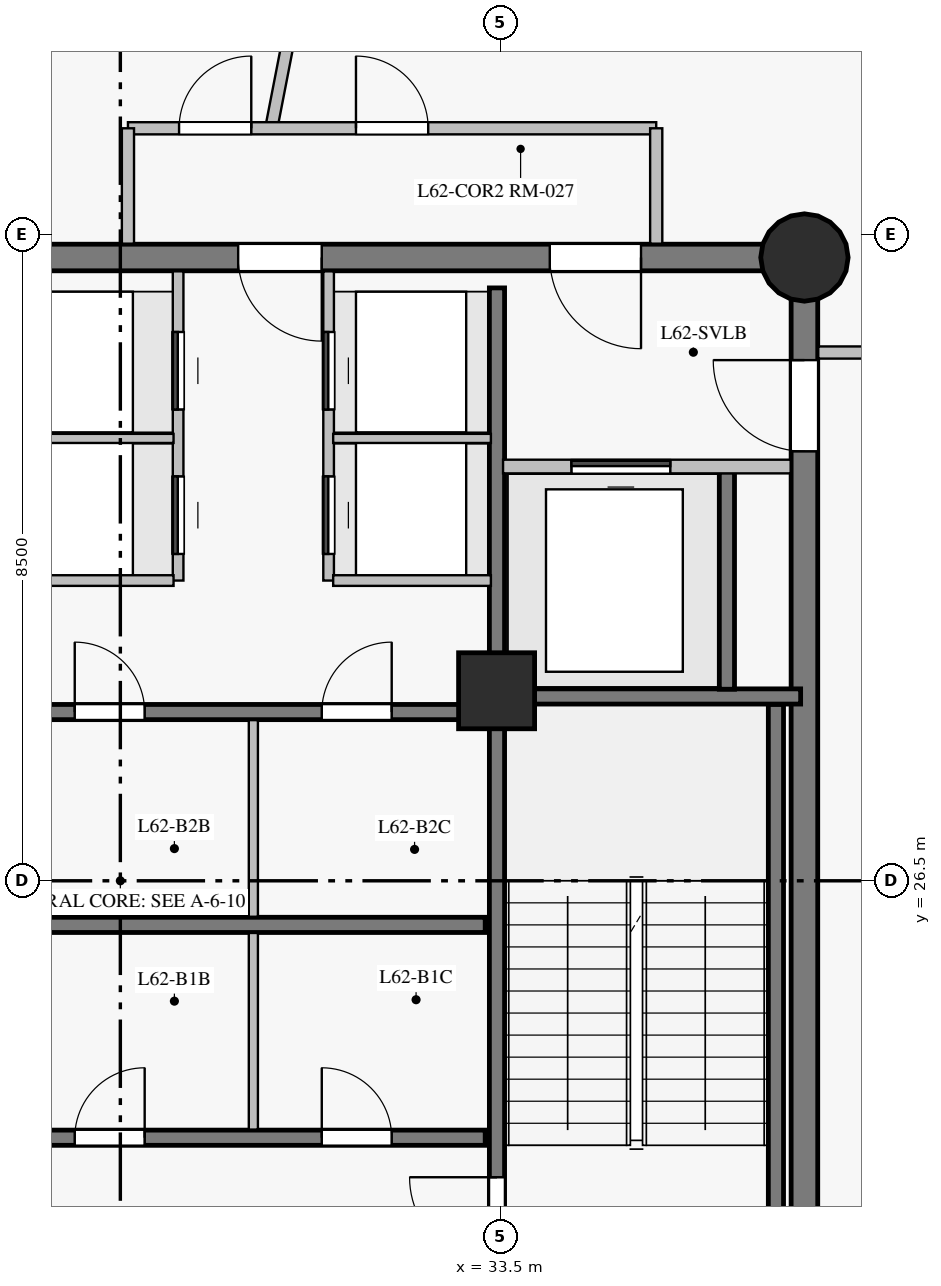
"""IFC4 building model, lengths in metres.
Left out: names, types, materials, properties, quantities, classifications, styles, units other than length and angle.
Written with IfcOpenShell. Run it as: python <this file> out.ifc"""

import sys

from ifc_helpers import new_model, si_unit, direction, frame, frame_2d, origin, origin_with_axes, origin_2d, place, context, subcontext, project, spatial, rectangle, circle, extrude, source, transform, mapped, element, fill, save


model = new_model("IFC4")
c1 = context("Model", 3, precision=1e-05, world=origin(), true_north=direction((0.0, 1.0)))
c2 = subcontext(c1, "Body", "Model", "MODEL_VIEW")
j1 = project(units=[si_unit("LENGTHUNIT", "METRE"), si_unit("PLANEANGLEUNIT", "RADIAN")], contexts=[c1])
p1 = place(None, origin())
s1 = spatial("IfcSite", under=j1, at=p1, CompositionType="ELEMENT")
p2 = place(p1, origin())
s2 = spatial("IfcBuilding", under=s1, at=p2, CompositionType="ELEMENT")
p3 = place(p2, frame((0.0, 0.0, 212.9)))
s3 = spatial("IfcBuildingStorey", under=s2, at=p3, CompositionType="ELEMENT", Elevation=212.9)
p4 = place(p3, frame((37.5, 18.3, 0.0), z_axis=(0.0, 0.0, 1.0), x_axis=(0.0, 1.0, 0.0)))
e1 = element("IfcWall", 1, at=p4, inside=s3, PredefinedType="SHEAR", context=c2, shape_type="SweptSolid", body=[
    extrude(rectangle(XDim=16.4, YDim=0.35, at=frame_2d((8.2, 0.0))), origin(), (0.0, 0.0, 1.0), 3.8),
])
p5 = place(p4, frame((13.85, 0.0, 0.0)))
e2 = element("IfcOpeningElement", 2, at=p5, cuts=e1, PredefinedType="OPENING", context=c2, shape_type="SweptSolid", body=[
    extrude(rectangle(XDim=1.2, YDim=2.15, at=frame_2d((0.6, 1.075))), frame((0.0, 0.185, 0.0), z_axis=(0.0, -1.0, 0.0), x_axis=(1.0, 0.0, 0.0)), (0.0, 0.0, 1.0), 0.37),
])
p6 = place(p3, frame((37.5, 34.7, 0.0), z_axis=(0.0, 0.0, 1.0), x_axis=(-1.0, 0.0, 0.0)))
e3 = element("IfcWall", 3, at=p6, inside=s3, PredefinedType="SHEAR", context=c2, shape_type="SweptSolid", body=[
    extrude(rectangle(XDim=10.95, YDim=0.35, at=frame_2d((5.475, 0.0))), origin(), (0.0, 0.0, 1.0), 3.8),
])
p7 = place(p6, frame((2.15, 0.0, 0.0)))
e4 = element("IfcOpeningElement", 4, at=p7, cuts=e3, PredefinedType="OPENING", context=c2, shape_type="SweptSolid", body=[
    extrude(rectangle(XDim=1.2, YDim=2.15, at=frame_2d((0.6, 1.075))), frame((0.0, 0.185, 0.0), z_axis=(0.0, -1.0, 0.0), x_axis=(1.0, 0.0, 0.0)), (0.0, 0.0, 1.0), 0.37),
])
p8 = place(p6, frame((6.35, 0.0, 0.0)))
e5 = element("IfcOpeningElement", 5, at=p8, cuts=e3, PredefinedType="OPENING", context=c2, shape_type="SweptSolid", body=[
    extrude(rectangle(XDim=1.1, YDim=2.15, at=frame_2d((0.55, 1.075))), frame((0.0, 0.185, 0.0), z_axis=(0.0, -1.0, 0.0), x_axis=(1.0, 0.0, 0.0)), (0.0, 0.0, 1.0), 0.37),
])
m1 = source(origin_with_axes(), c2, "Body", "SweptSolid", [
    extrude(circle(Radius=0.575, at=origin_2d()), origin(), (0.0, 0.0, 1.0), 4.0),
])
p9 = place(p3, frame((37.5, 34.7, 0.0), z_axis=(0.0, 0.0, 1.0), x_axis=(1.0, 0.0, 0.0)))
e6 = element("IfcColumn", 6, at=p9, inside=s3, PredefinedType="COLUMN", context=c2, shape_type="MappedRepresentation", body=[
    mapped(m1, transform((0.0, 0.0, 0.0), scale=1.0)),
])
m2 = source(origin_with_axes(), c2, "Body", "SweptSolid", [
    extrude(rectangle(XDim=1.0, YDim=1.0, at=origin_2d()), origin(), (0.0, 0.0, 1.0), 4.0),
])
p10 = place(p3, frame((33.45, 29.0, 0.0), z_axis=(0.0, 0.0, 1.0), x_axis=(1.0, 0.0, 0.0)))
e7 = element("IfcColumn", 7, at=p10, inside=s3, PredefinedType="COLUMN", context=c2, shape_type="MappedRepresentation", body=[
    mapped(m2, transform((0.0, 0.0, 0.0), scale=1.0)),
])
p11 = place(p3, frame((33.455, 18.7, 0.0), z_axis=(0.0, 0.0, 1.0), x_axis=(0.0, 1.0, 0.0)))
e8 = element("IfcWall", 8, at=p11, inside=s3, PredefinedType="SHEAR", context=c2, shape_type="SweptSolid", body=[
    extrude(rectangle(XDim=15.6, YDim=0.2, at=frame_2d((7.8, 0.0))), origin(), (0.0, 0.0, 1.0), 3.8),
])
p12 = place(p11, frame((2.75, 0.0, 0.0)))
e9 = element("IfcOpeningElement", 9, at=p12, cuts=e8, PredefinedType="OPENING", context=c2, shape_type="SweptSolid", body=[
    extrude(rectangle(XDim=1.15, YDim=2.15, at=frame_2d((0.575, 1.075))), frame((0.0, 0.11, 0.0), z_axis=(0.0, -1.0, 0.0), x_axis=(1.0, 0.0, 0.0)), (0.0, 0.0, 1.0), 0.22),
])
p13 = place(p11, frame((0.55, 0.0, 0.0)))
e10 = element("IfcOpeningElement", 10, at=p13, cuts=e8, PredefinedType="OPENING", context=c2, shape_type="SweptSolid", body=[
    extrude(rectangle(XDim=0.94, YDim=2.1, at=frame_2d((0.47, 1.05))), frame((0.0, 0.11, 0.0), z_axis=(0.0, -1.0, 0.0), x_axis=(1.0, 0.0, 0.0)), (0.0, 0.0, 1.0), 0.22),
])
p14 = place(p3, frame((23.7, 23.12, 0.0), z_axis=(0.0, 0.0, 1.0), x_axis=(1.0, 0.0, 0.0)))
e11 = element("IfcWall", 11, at=p14, inside=s3, PredefinedType="SHEAR", context=c2, shape_type="SweptSolid", body=[
    extrude(rectangle(XDim=9.6, YDim=0.2, at=frame_2d((4.8, 0.0))), origin(), (0.0, 0.0, 1.0), 3.8),
])
p15 = place(p14, frame((0.7, 0.0, 0.0)))
e12 = element("IfcOpeningElement", 12, at=p15, cuts=e11, PredefinedType="OPENING", context=c2, shape_type="SweptSolid", body=[
    extrude(rectangle(XDim=0.92, YDim=2.1, at=frame_2d((0.46, 1.05))), frame((0.0, 0.11, 0.0), z_axis=(0.0, -1.0, 0.0), x_axis=(1.0, 0.0, 0.0)), (0.0, 0.0, 1.0), 0.22),
])
p16 = place(p14, frame((4.2, 0.0, 0.0)))
e13 = element("IfcOpeningElement", 13, at=p16, cuts=e11, PredefinedType="OPENING", context=c2, shape_type="SweptSolid", body=[
    extrude(rectangle(XDim=0.92, YDim=2.1, at=frame_2d((0.46, 1.05))), frame((0.0, 0.11, 0.0), z_axis=(0.0, -1.0, 0.0), x_axis=(1.0, 0.0, 0.0)), (0.0, 0.0, 1.0), 0.22),
])
p17 = place(p14, frame((7.45, 0.0, 0.0)))
e14 = element("IfcOpeningElement", 14, at=p17, cuts=e11, PredefinedType="OPENING", context=c2, shape_type="SweptSolid", body=[
    extrude(rectangle(XDim=0.92, YDim=2.1, at=frame_2d((0.46, 1.05))), frame((0.0, 0.11, 0.0), z_axis=(0.0, -1.0, 0.0), x_axis=(1.0, 0.0, 0.0)), (0.0, 0.0, 1.0), 0.22),
])
p18 = place(p3, frame((23.7, 25.92, 0.0), z_axis=(0.0, 0.0, 1.0), x_axis=(1.0, 0.0, 0.0)))
e15 = element("IfcWall", 15, at=p18, inside=s3, PredefinedType="SHEAR", context=c2, shape_type="SweptSolid", body=[
    extrude(rectangle(XDim=9.6, YDim=0.2, at=frame_2d((4.8, 0.0))), origin(), (0.0, 0.0, 1.0), 3.8),
])
p19 = place(p3, frame((23.7, 28.72, 0.0), z_axis=(0.0, 0.0, 1.0), x_axis=(1.0, 0.0, 0.0)))
e16 = element("IfcWall", 16, at=p19, inside=s3, PredefinedType="SHEAR", context=c2, shape_type="SweptSolid", body=[
    extrude(rectangle(XDim=9.6, YDim=0.2, at=frame_2d((4.8, 0.0))), origin(), (0.0, 0.0, 1.0), 3.8),
])
p20 = place(p19, frame((0.7, 0.0, 0.0)))
e17 = element("IfcOpeningElement", 17, at=p20, cuts=e16, PredefinedType="OPENING", context=c2, shape_type="SweptSolid", body=[
    extrude(rectangle(XDim=0.92, YDim=2.1, at=frame_2d((0.46, 1.05))), frame((0.0, 0.11, 0.0), z_axis=(0.0, -1.0, 0.0), x_axis=(1.0, 0.0, 0.0)), (0.0, 0.0, 1.0), 0.22),
])
p21 = place(p19, frame((4.2, 0.0, 0.0)))
e18 = element("IfcOpeningElement", 18, at=p21, cuts=e16, PredefinedType="OPENING", context=c2, shape_type="SweptSolid", body=[
    extrude(rectangle(XDim=0.92, YDim=2.1, at=frame_2d((0.46, 1.05))), frame((0.0, 0.11, 0.0), z_axis=(0.0, -1.0, 0.0), x_axis=(1.0, 0.0, 0.0)), (0.0, 0.0, 1.0), 0.22),
])
p22 = place(p19, frame((7.45, 0.0, 0.0)))
e19 = element("IfcOpeningElement", 19, at=p22, cuts=e16, PredefinedType="OPENING", context=c2, shape_type="SweptSolid", body=[
    extrude(rectangle(XDim=0.92, YDim=2.1, at=frame_2d((0.46, 1.05))), frame((0.0, 0.11, 0.0), z_axis=(0.0, -1.0, 0.0), x_axis=(1.0, 0.0, 0.0)), (0.0, 0.0, 1.0), 0.22),
])
p23 = place(p3, frame((37.125, 21.32, 0.0), z_axis=(0.0, 0.0, 1.0), x_axis=(0.0, 1.0, 0.0)))
e20 = element("IfcWall", 20, at=p23, inside=s3, PredefinedType="SHEAR", context=c2, shape_type="SweptSolid", body=[
    extrude(rectangle(XDim=7.5, YDim=0.2, at=frame_2d((3.75, 0.0))), origin(), (0.0, 0.0, 1.0), 3.8),
])
p24 = place(p3, frame((33.455, 28.925, 0.0), z_axis=(0.0, 0.0, 1.0), x_axis=(1.0, 0.0, 0.0)))
e21 = element("IfcWall", 21, at=p24, inside=s3, PredefinedType="SHEAR", context=c2, shape_type="SweptSolid", body=[
    extrude(rectangle(XDim=3.995, YDim=0.2, at=frame_2d((1.998, 0.0))), origin(), (0.0, 0.0, 1.0), 3.8),
])
p25 = place(p3, frame((36.48, 29.02, 0.0), z_axis=(0.0, 0.0, 1.0), x_axis=(0.0, 1.0, 0.0)))
e22 = element("IfcWall", 22, at=p25, inside=s3, PredefinedType="SHEAR", context=c2, shape_type="SweptSolid", body=[
    extrude(rectangle(XDim=2.86, YDim=0.2, at=frame_2d((1.43, 0.0))), origin(), (0.0, 0.0, 1.0), 3.8),
])
p26 = place(p3, frame((30.48, 36.371, 0.0), z_axis=(0.0, 0.0, 1.0), x_axis=(0.190812831834, 0.981626437708, 0.0)))
e23 = element("IfcWall", 23, at=p26, inside=s3, PredefinedType="PARTITIONING", context=c2, shape_type="SweptSolid", body=[
    extrude(rectangle(XDim=12.764, YDim=0.16, at=frame_2d((6.382, 0.0))), origin(), (0.0, 0.0, 1.0), 3.8),
])
p27 = place(p3, frame((28.6, 36.4, 0.0), z_axis=(0.0, 0.0, 1.0), x_axis=(1.0, 0.0, 0.0)))
e24 = element("IfcWall", 24, at=p27, inside=s3, PredefinedType="PARTITIONING", context=c2, shape_type="SweptSolid", body=[
    extrude(rectangle(XDim=6.95, YDim=0.16, at=frame_2d((3.475, 0.0))), origin(), (0.0, 0.0, 1.0), 3.4),
])
p28 = place(p27, frame((3.0, 0.0, 0.0)))
e25 = element("IfcOpeningElement", 25, at=p28, cuts=e24, PredefinedType="OPENING", context=c2, shape_type="SweptSolid", body=[
    extrude(rectangle(XDim=0.95, YDim=2.15, at=frame_2d((0.475, 1.075))), frame((0.0, 0.09, 0.0), z_axis=(0.0, -1.0, 0.0), x_axis=(1.0, 0.0, 0.0)), (0.0, 0.0, 1.0), 0.18),
])
p29 = place(p27, frame((0.673, 0.0, 0.0)))
e26 = element("IfcOpeningElement", 26, at=p29, cuts=e24, PredefinedType="OPENING", context=c2, shape_type="SweptSolid", body=[
    extrude(rectangle(XDim=0.95, YDim=2.15, at=frame_2d((0.475, 1.075))), frame((0.0, 0.09, 0.0), z_axis=(0.0, -1.0, 0.0), x_axis=(1.0, 0.0, 0.0)), (0.0, 0.0, 1.0), 0.18),
])
p30 = place(p3, frame((37.682, 33.45, 0.0), z_axis=(0.0, 0.0, 1.0), x_axis=(1.0, 0.0, 0.0)))
e27 = element("IfcWall", 27, at=p30, inside=s3, PredefinedType="PARTITIONING", context=c2, shape_type="SweptSolid", body=[
    extrude(rectangle(XDim=4.118, YDim=0.16, at=frame_2d((2.059, 0.0))), origin(), (0.0, 0.0, 1.0), 3.8),
])
p31 = place(p3, frame((29.26, 30.45, 0.0), z_axis=(0.0, 0.0, 1.0), x_axis=(0.0, 1.0, 0.0)))
e28 = element("IfcWall", 28, at=p31, inside=s3, PredefinedType="PARTITIONING", context=c2, shape_type="SweptSolid", body=[
    extrude(rectangle(XDim=4.068, YDim=0.14, at=frame_2d((2.034, 0.0))), origin(), (0.0, 0.0, 1.0), 3.8),
])
p32 = place(p31, frame((0.35, 0.0, 0.0)))
e29 = element("IfcOpeningElement", 29, at=p32, cuts=e28, PredefinedType="OPENING", context=c2, shape_type="SweptSolid", body=[
    extrude(rectangle(XDim=1.02, YDim=2.15, at=frame_2d((0.51, 1.075))), frame((0.0, 0.08, 0.0), z_axis=(0.0, -1.0, 0.0), x_axis=(1.0, 0.0, 0.0)), (0.0, 0.0, 1.0), 0.16),
])
p33 = place(p31, frame((2.25, 0.0, 0.0)))
e30 = element("IfcOpeningElement", 30, at=p33, cuts=e28, PredefinedType="OPENING", context=c2, shape_type="SweptSolid", body=[
    extrude(rectangle(XDim=1.02, YDim=2.15, at=frame_2d((0.51, 1.075))), frame((0.0, 0.08, 0.0), z_axis=(0.0, -1.0, 0.0), x_axis=(1.0, 0.0, 0.0)), (0.0, 0.0, 1.0), 0.16),
])
p34 = place(p3, frame((31.24, 30.45, 0.0), z_axis=(0.0, 0.0, 1.0), x_axis=(0.0, 1.0, 0.0)))
e31 = element("IfcWall", 31, at=p34, inside=s3, PredefinedType="PARTITIONING", context=c2, shape_type="SweptSolid", body=[
    extrude(rectangle(XDim=4.068, YDim=0.14, at=frame_2d((2.034, 0.0))), origin(), (0.0, 0.0, 1.0), 3.8),
])
p35 = place(p34, frame((0.35, 0.0, 0.0)))
e32 = element("IfcOpeningElement", 32, at=p35, cuts=e31, PredefinedType="OPENING", context=c2, shape_type="SweptSolid", body=[
    extrude(rectangle(XDim=1.02, YDim=2.15, at=frame_2d((0.51, 1.075))), frame((0.0, 0.08, 0.0), z_axis=(0.0, -1.0, 0.0), x_axis=(1.0, 0.0, 0.0)), (0.0, 0.0, 1.0), 0.16),
])
p36 = place(p34, frame((2.25, 0.0, 0.0)))
e33 = element("IfcOpeningElement", 33, at=p36, cuts=e31, PredefinedType="OPENING", context=c2, shape_type="SweptSolid", body=[
    extrude(rectangle(XDim=1.02, YDim=2.15, at=frame_2d((0.51, 1.075))), frame((0.0, 0.08, 0.0), z_axis=(0.0, -1.0, 0.0), x_axis=(1.0, 0.0, 0.0)), (0.0, 0.0, 1.0), 0.16),
])
p37 = place(p3, frame((33.535, 31.95, 0.0), z_axis=(0.0, 0.0, 1.0), x_axis=(1.0, 0.0, 0.0)))
e34 = element("IfcWall", 34, at=p37, inside=s3, PredefinedType="PARTITIONING", context=c2, shape_type="SweptSolid", body=[
    extrude(rectangle(XDim=3.784, YDim=0.18, at=frame_2d((1.892, 0.0))), origin(), (0.0, 0.0, 1.0), 3.8),
])
p38 = place(p37, frame((0.9, 0.0, 0.0)))
e35 = element("IfcOpeningElement", 35, at=p38, cuts=e34, PredefinedType="OPENING", context=c2, shape_type="SweptSolid", body=[
    extrude(rectangle(XDim=1.3, YDim=2.2, at=frame_2d((0.65, 1.1))), frame((0.0, 0.1, 0.0), z_axis=(0.0, -1.0, 0.0), x_axis=(1.0, 0.0, 0.0)), (0.0, 0.0, 1.0), 0.2),
])
p39 = place(p3, frame((26.62, 30.45, 0.0), z_axis=(0.0, 0.0, 1.0), x_axis=(1.0, 0.0, 0.0)))
e36 = element("IfcWall", 36, at=p39, inside=s3, PredefinedType="PARTITIONING", context=c2, shape_type="SweptSolid", body=[
    extrude(rectangle(XDim=2.58, YDim=0.14, at=frame_2d((1.29, 0.0))), origin(), (0.0, 0.0, 1.0), 3.8),
])
p40 = place(p3, frame((26.62, 32.32, 0.0), z_axis=(0.0, 0.0, 1.0), x_axis=(1.0, 0.0, 0.0)))
e37 = element("IfcWall", 37, at=p40, inside=s3, PredefinedType="PARTITIONING", context=c2, shape_type="SweptSolid", body=[
    extrude(rectangle(XDim=2.58, YDim=0.12, at=frame_2d((1.29, 0.0))), origin(), (0.0, 0.0, 1.0), 3.8),
])
for number, where, z_axis, x_axis in (
    (38, (30.25, 23.227, 0.0), (0.0, 0.0, 1.0), (0.0, 1.0, 0.0)),
    (39, (30.25, 26.027, 0.0), (0.0, 0.0, 1.0), (0.0, 1.0, 0.0)),
):
    element("IfcWall", number, at=place(p3, frame(where, z_axis=z_axis, x_axis=x_axis)), inside=s3, PredefinedType="PARTITIONING", context=c2, shape_type="SweptSolid", body=[
        extrude(rectangle(XDim=2.587, YDim=0.12, at=frame_2d((1.293, 0.0))), origin(), (0.0, 0.0, 1.0), 3.8),
    ])
p41 = place(p3, frame((31.3, 30.45, 0.0), z_axis=(0.0, 0.0, 1.0), x_axis=(1.0, 0.0, 0.0)))
e40 = element("IfcWall", 40, at=p41, inside=s3, PredefinedType="PARTITIONING", context=c2, shape_type="SweptSolid", body=[
    extrude(rectangle(XDim=2.075, YDim=0.14, at=frame_2d((1.038, 0.0))), origin(), (0.0, 0.0, 1.0), 3.8),
])
p42 = place(p3, frame((31.3, 32.32, 0.0), z_axis=(0.0, 0.0, 1.0), x_axis=(1.0, 0.0, 0.0)))
e41 = element("IfcWall", 41, at=p42, inside=s3, PredefinedType="PARTITIONING", context=c2, shape_type="SweptSolid", body=[
    extrude(rectangle(XDim=2.075, YDim=0.12, at=frame_2d((1.038, 0.0))), origin(), (0.0, 0.0, 1.0), 3.8),
])
for number, where, z_axis, x_axis in (
    (42, (28.6, 34.882, 0.0), (0.0, 0.0, 1.0), (0.0, 1.0, 0.0)),
    (43, (35.55, 36.4, 0.0), (0.0, 0.0, 1.0), (0.0, -1.0, 0.0)),
):
    element("IfcWall", number, at=place(p3, frame(where, z_axis=z_axis, x_axis=x_axis)), inside=s3, PredefinedType="PARTITIONING", context=c2, shape_type="SweptSolid", body=[
        extrude(rectangle(XDim=1.518, YDim=0.16, at=frame_2d((0.759, 0.0))), origin(), (0.0, 0.0, 1.0), 3.8),
    ])
m3 = source(origin_with_axes(), c2, "Body", "SweptSolid", [
    extrude(rectangle(XDim=1.15, YDim=2.15, at=frame_2d((0.575, 1.075))), frame((0.0, 0.025, 0.0), z_axis=(0.0, -1.0, 0.0), x_axis=(1.0, 0.0, 0.0)), (0.0, 0.0, 1.0), 0.05),
])
p43 = place(p12, origin())
e44 = element("IfcDoor", 44, at=p43, inside=s3, OperationType="SINGLE_SWING_RIGHT", PredefinedType="DOOR", context=c2, shape_type="MappedRepresentation", body=[
    mapped(m3, transform((0.0, 0.0, 0.0), scale=1.0)),
])
fill(e9, e44)
m4 = source(origin_with_axes(), c2, "Body", "SweptSolid", [
    extrude(rectangle(XDim=1.2, YDim=2.15, at=frame_2d((0.6, 1.075))), frame((0.0, 0.025, 0.0), z_axis=(0.0, -1.0, 0.0), x_axis=(1.0, 0.0, 0.0)), (0.0, 0.0, 1.0), 0.05),
])
p44 = place(p5, origin())
e45 = element("IfcDoor", 45, at=p44, inside=s3, OperationType="SINGLE_SWING_RIGHT", PredefinedType="DOOR", context=c2, shape_type="MappedRepresentation", body=[
    mapped(m4, transform((0.0, 0.0, 0.0), scale=1.0)),
])
fill(e2, e45)
p45 = place(p7, origin())
e46 = element("IfcDoor", 46, at=p45, inside=s3, OperationType="SINGLE_SWING_LEFT", PredefinedType="DOOR", context=c2, shape_type="MappedRepresentation", body=[
    mapped(m4, transform((0.0, 0.0, 0.0), scale=1.0)),
])
fill(e4, e46)
m5 = source(origin_with_axes(), c2, "Body", "SweptSolid", [
    extrude(rectangle(XDim=1.3, YDim=2.2, at=frame_2d((0.65, 1.1))), frame((0.0, 0.025, 0.0), z_axis=(0.0, -1.0, 0.0), x_axis=(1.0, 0.0, 0.0)), (0.0, 0.0, 1.0), 0.05),
])
p46 = place(p38, origin())
e47 = element("IfcDoor", 47, at=p46, inside=s3, OperationType="SLIDING_TO_LEFT", PredefinedType="DOOR", context=c2, shape_type="MappedRepresentation", body=[
    mapped(m5, transform((0.0, 0.0, 0.0), scale=1.0)),
])
fill(e35, e47)
m6 = source(origin_with_axes(), c2, "Body", "SweptSolid", [
    extrude(rectangle(XDim=0.92, YDim=2.1, at=frame_2d((0.46, 1.05))), frame((0.0, 0.025, 0.0), z_axis=(0.0, -1.0, 0.0), x_axis=(1.0, 0.0, 0.0)), (0.0, 0.0, 1.0), 0.05),
])
p47 = place(p16, origin())
e48 = element("IfcDoor", 48, at=p47, inside=s3, OperationType="SINGLE_SWING_RIGHT", PredefinedType="DOOR", context=c2, shape_type="MappedRepresentation", body=[
    mapped(m6, transform((0.0, 0.0, 0.0), scale=1.0)),
])
fill(e13, e48)
p48 = place(p17, origin())
e49 = element("IfcDoor", 49, at=p48, inside=s3, OperationType="SINGLE_SWING_LEFT", PredefinedType="DOOR", context=c2, shape_type="MappedRepresentation", body=[
    mapped(m6, transform((0.0, 0.0, 0.0), scale=1.0)),
])
fill(e14, e49)
p49 = place(p21, origin())
e50 = element("IfcDoor", 50, at=p49, inside=s3, OperationType="SINGLE_SWING_LEFT", PredefinedType="DOOR", context=c2, shape_type="MappedRepresentation", body=[
    mapped(m6, transform((0.0, 0.0, 0.0), scale=1.0)),
])
fill(e18, e50)
p50 = place(p22, origin())
e51 = element("IfcDoor", 51, at=p50, inside=s3, OperationType="SINGLE_SWING_RIGHT", PredefinedType="DOOR", context=c2, shape_type="MappedRepresentation", body=[
    mapped(m6, transform((0.0, 0.0, 0.0), scale=1.0)),
])
fill(e19, e51)
m7 = source(origin_with_axes(), c2, "Body", "SweptSolid", [
    extrude(rectangle(XDim=1.1, YDim=2.15, at=frame_2d((0.55, 1.075))), frame((0.0, 0.025, 0.0), z_axis=(0.0, -1.0, 0.0), x_axis=(1.0, 0.0, 0.0)), (0.0, 0.0, 1.0), 0.05),
])
p51 = place(p8, origin())
e52 = element("IfcDoor", 52, at=p51, inside=s3, OperationType="SINGLE_SWING_LEFT", PredefinedType="DOOR", context=c2, shape_type="MappedRepresentation", body=[
    mapped(m7, transform((0.0, 0.0, 0.0), scale=1.0)),
])
fill(e5, e52)
m8 = source(origin_with_axes(), c2, "Body", "SweptSolid", [
    extrude(rectangle(XDim=1.02, YDim=2.15, at=frame_2d((0.51, 1.075))), frame((0.0, 0.025, 0.0), z_axis=(0.0, -1.0, 0.0), x_axis=(1.0, 0.0, 0.0)), (0.0, 0.0, 1.0), 0.05),
])
p52 = place(p32, origin())
e53 = element("IfcDoor", 53, at=p52, inside=s3, OperationType="SLIDING_TO_LEFT", PredefinedType="DOOR", context=c2, shape_type="MappedRepresentation", body=[
    mapped(m8, transform((0.0, 0.0, 0.0), scale=1.0)),
])
fill(e29, e53)
p53 = place(p33, origin())
e54 = element("IfcDoor", 54, at=p53, inside=s3, OperationType="SLIDING_TO_LEFT", PredefinedType="DOOR", context=c2, shape_type="MappedRepresentation", body=[
    mapped(m8, transform((0.0, 0.0, 0.0), scale=1.0)),
])
fill(e30, e54)
p54 = place(p35, origin())
e55 = element("IfcDoor", 55, at=p54, inside=s3, OperationType="SLIDING_TO_LEFT", PredefinedType="DOOR", context=c2, shape_type="MappedRepresentation", body=[
    mapped(m8, transform((0.0, 0.0, 0.0), scale=1.0)),
])
fill(e32, e55)
p55 = place(p36, origin())
e56 = element("IfcDoor", 56, at=p55, inside=s3, OperationType="SLIDING_TO_LEFT", PredefinedType="DOOR", context=c2, shape_type="MappedRepresentation", body=[
    mapped(m8, transform((0.0, 0.0, 0.0), scale=1.0)),
])
fill(e33, e56)
m9 = source(origin_with_axes(), c2, "Body", "SweptSolid", [
    extrude(rectangle(XDim=0.95, YDim=2.15, at=frame_2d((0.475, 1.075))), frame((0.0, 0.025, 0.0), z_axis=(0.0, -1.0, 0.0), x_axis=(1.0, 0.0, 0.0)), (0.0, 0.0, 1.0), 0.05),
])
p56 = place(p28, origin())
e57 = element("IfcDoor", 57, at=p56, inside=s3, OperationType="SINGLE_SWING_LEFT", PredefinedType="DOOR", context=c2, shape_type="MappedRepresentation", body=[
    mapped(m9, transform((0.0, 0.0, 0.0), scale=1.0)),
])
fill(e25, e57)
p57 = place(p29, origin())
e58 = element("IfcDoor", 58, at=p57, inside=s3, OperationType="SINGLE_SWING_RIGHT", PredefinedType="DOOR", context=c2, shape_type="MappedRepresentation", body=[
    mapped(m9, transform((0.0, 0.0, 0.0), scale=1.0)),
])
fill(e26, e58)
save(model, sys.argv[1])
